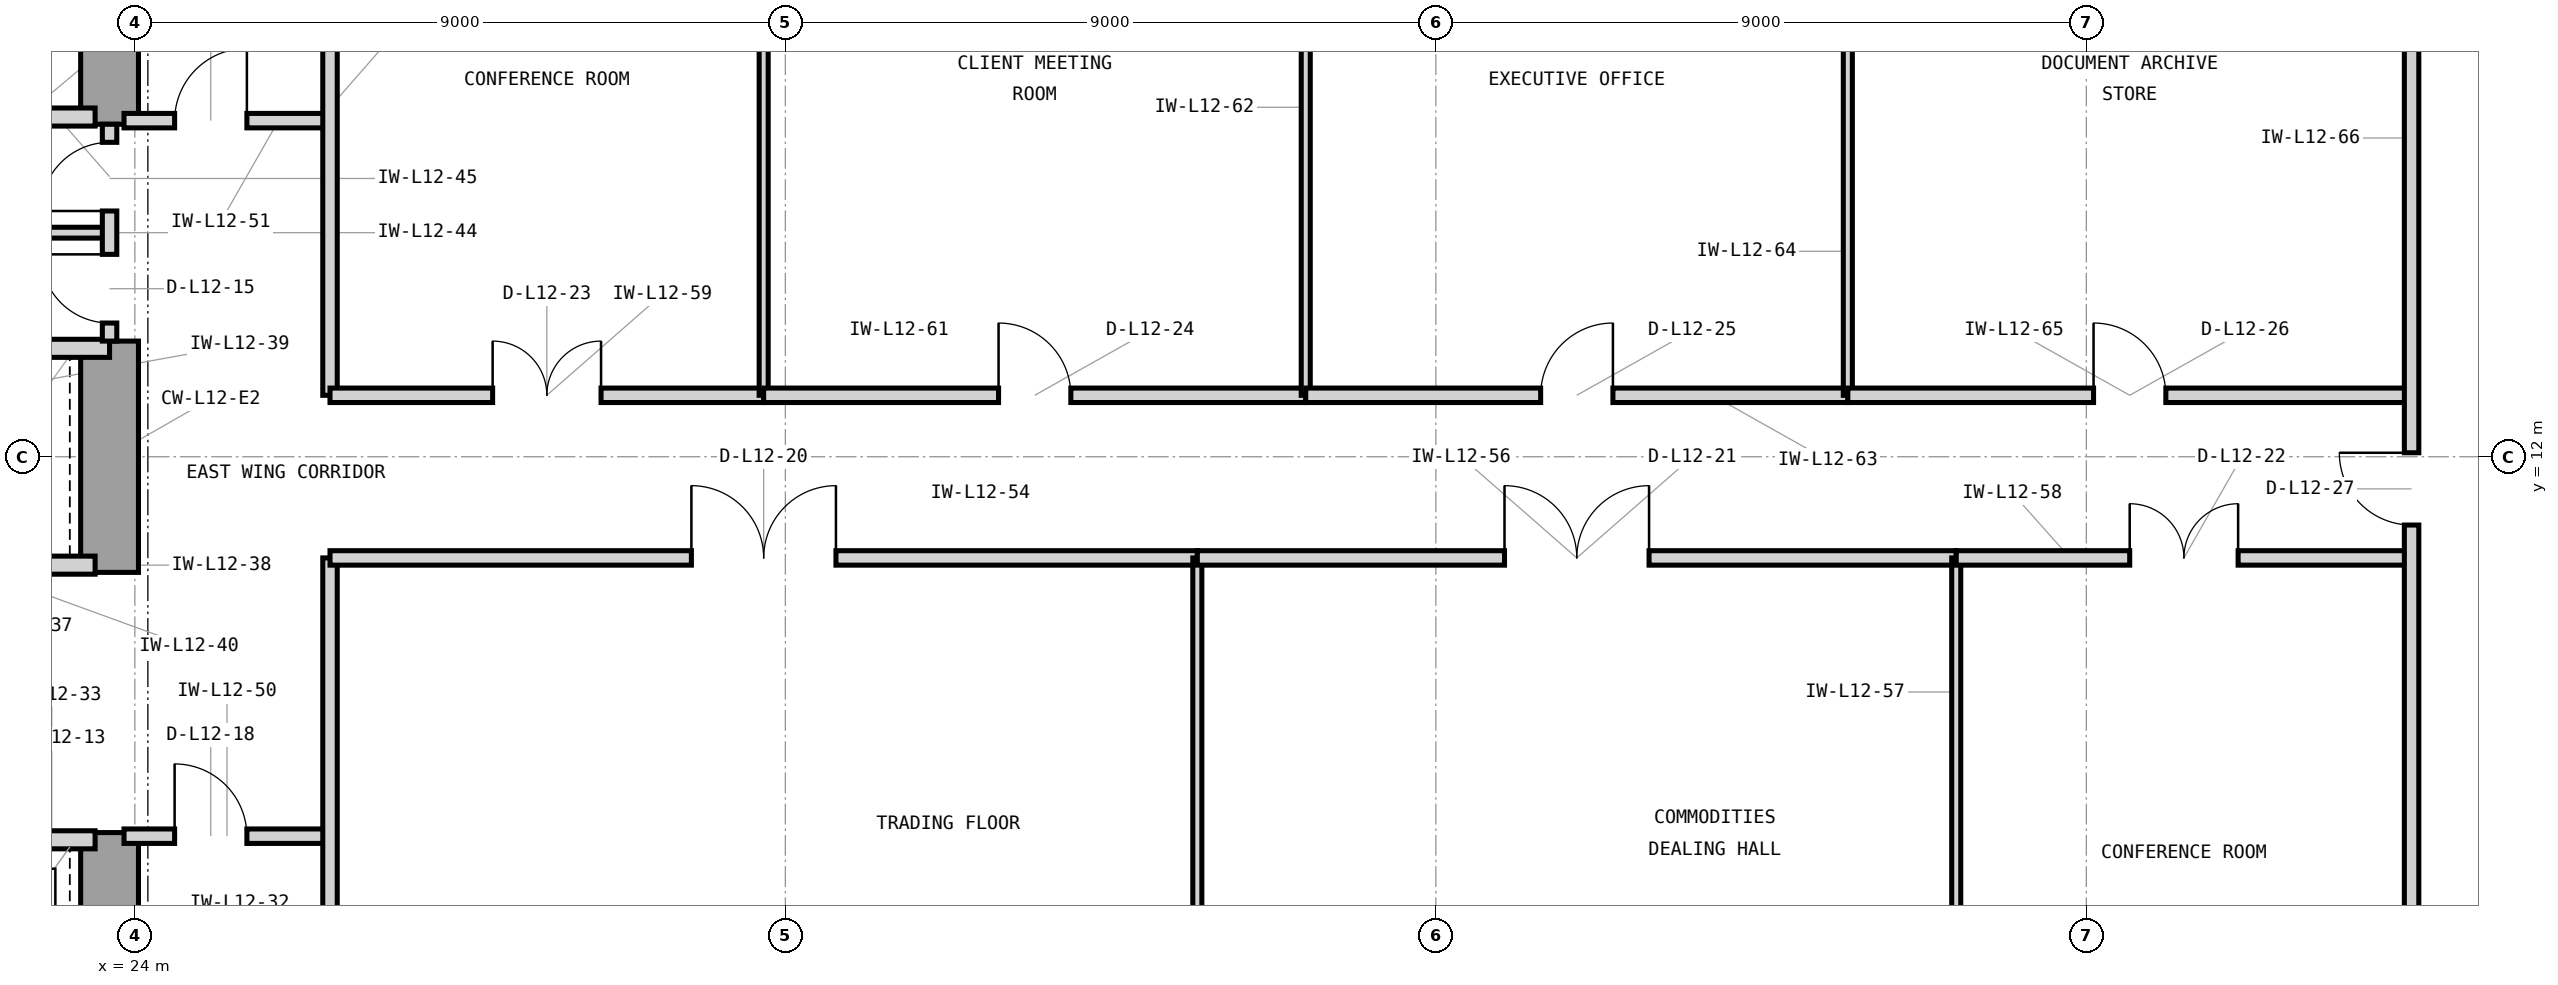
"""IFC4 building model, lengths in metres.
Left out: names, types, materials, properties, quantities, classifications, styles, units other than length and angle.
Written with IfcOpenShell. Run it as: python <this file> out.ifc"""

import sys

from ifc_helpers import new_model, si_unit, direction, frame, frame_2d, origin, place, context, subcontext, project, spatial, rectangle, extrude, element, fill, save


model = new_model("IFC4")
c1 = context("Model", 3, precision=1e-05, world=origin(), true_north=direction((0.0, 1.0)))
c2 = subcontext(c1, "Body", "Model", "MODEL_VIEW")
j1 = project(units=[si_unit("LENGTHUNIT", "METRE"), si_unit("PLANEANGLEUNIT", "RADIAN")], contexts=[c1])
p1 = place(None, origin())
s1 = spatial("IfcSite", under=j1, at=p1, CompositionType="ELEMENT")
p2 = place(p1, origin())
s2 = spatial("IfcBuilding", under=s1, at=p2, CompositionType="ELEMENT")
p3 = place(p2, frame((0.0, 0.0, 55.2)))
s3 = spatial("IfcBuildingStorey", under=s2, at=p3, CompositionType="ELEMENT", Elevation=55.2)
p4 = place(p3, frame((23.65, 3.75, 0.0), z_axis=(0.0, 0.0, 1.0), x_axis=(0.0, 1.0, 0.0)))
e1 = element("IfcWall", 1, at=p4, inside=s3, PredefinedType="SHEAR", context=c2, shape_type="SweptSolid", body=[
    extrude(rectangle(XDim=3.05, YDim=0.8, at=frame_2d((1.525, 0.0))), origin(), (0.0, 0.0, 1.0), 4.2),
])
p5 = place(p3, frame((23.65, 10.4, 0.0), z_axis=(0.0, 0.0, 1.0), x_axis=(0.0, 1.0, 0.0)))
e2 = element("IfcWall", 2, at=p5, inside=s3, PredefinedType="SHEAR", context=c2, shape_type="SweptSolid", body=[
    extrude(rectangle(XDim=3.2, YDim=0.8, at=frame_2d((1.6, 0.0))), origin(), (0.0, 0.0, 1.0), 4.2),
])
p6 = place(p3, frame((23.65, 16.6, 0.0), z_axis=(0.0, 0.0, 1.0), x_axis=(0.0, 1.0, 0.0)))
e3 = element("IfcWall", 3, at=p6, inside=s3, PredefinedType="SHEAR", context=c2, shape_type="SweptSolid", body=[
    extrude(rectangle(XDim=4.05, YDim=0.8, at=frame_2d((2.025, 0.0))), origin(), (0.0, 0.0, 1.0), 4.2),
])
p7 = place(p3, frame((21.05, 16.7, 0.0), z_axis=(0.0, 0.0, 1.0), x_axis=(1.0, 0.0, 0.0)))
e4 = element("IfcWall", 4, at=p7, inside=s3, PredefinedType="PARTITIONING", context=c2, shape_type="SweptSolid", body=[
    extrude(rectangle(XDim=2.4, YDim=0.25, at=frame_2d((1.2, 0.0))), origin(), (0.0, 0.0, 1.0), 3.426),
])
p8 = place(p3, frame((21.05, 6.7, 0.0), z_axis=(0.0, 0.0, 1.0), x_axis=(1.0, 0.0, 0.0)))
e5 = element("IfcWall", 5, at=p8, inside=s3, PredefinedType="PARTITIONING", context=c2, shape_type="SweptSolid", body=[
    extrude(rectangle(XDim=2.4, YDim=0.25, at=frame_2d((1.2, 0.0))), origin(), (0.0, 0.0, 1.0), 3.426),
])
p9 = place(p8, frame((0.48, 0.0, 0.0)))
e6 = element("IfcOpeningElement", 6, at=p9, cuts=e5, PredefinedType="OPENING", context=c2, shape_type="SweptSolid", body=[
    extrude(rectangle(XDim=1.15, YDim=2.25, at=frame_2d((0.575, 1.125))), frame((0.0, 0.135, 0.0), z_axis=(0.0, -1.0, 0.0), x_axis=(1.0, 0.0, 0.0)), (0.0, 0.0, 1.0), 0.27),
])
p10 = place(p3, frame((21.05, 10.5, 0.0), z_axis=(0.0, 0.0, 1.0), x_axis=(1.0, 0.0, 0.0)))
e7 = element("IfcWall", 7, at=p10, inside=s3, PredefinedType="PARTITIONING", context=c2, shape_type="SweptSolid", body=[
    extrude(rectangle(XDim=2.4, YDim=0.25, at=frame_2d((1.2, 0.0))), origin(), (0.0, 0.0, 1.0), 3.426),
])
p11 = place(p3, frame((14.7, 13.5, 0.0), z_axis=(0.0, 0.0, 1.0), x_axis=(1.0, 0.0, 0.0)))
e8 = element("IfcWall", 8, at=p11, inside=s3, PredefinedType="PARTITIONING", context=c2, shape_type="SweptSolid", body=[
    extrude(rectangle(XDim=8.95, YDim=0.25, at=frame_2d((4.475, 0.0))), origin(), (0.0, 0.0, 1.0), 3.426),
])
p12 = place(p3, frame((19.65, 15.1, 0.0), z_axis=(0.0, 0.0, 1.0), x_axis=(1.0, 0.0, 0.0)))
e9 = element("IfcWall", 9, at=p12, inside=s3, PredefinedType="PARTITIONING", context=c2, shape_type="SweptSolid", body=[
    extrude(rectangle(XDim=4.0, YDim=0.15, at=frame_2d((2.0, 0.0))), origin(), (0.0, 0.0, 1.0), 3.97),
])
p13 = place(p3, frame((23.65, 13.6, 0.0), z_axis=(0.0, 0.0, 1.0), x_axis=(0.0, 1.0, 0.0)))
e10 = element("IfcWall", 10, at=p13, inside=s3, PredefinedType="PARTITIONING", context=c2, shape_type="SweptSolid", body=[
    extrude(rectangle(XDim=3.0, YDim=0.2, at=frame_2d((1.5, 0.0))), origin(), (0.0, 0.0, 1.0), 3.97),
])
p14 = place(p13, frame((0.25, 0.0, 0.0)))
e11 = element("IfcOpeningElement", 11, at=p14, cuts=e10, PredefinedType="OPENING", context=c2, shape_type="SweptSolid", body=[
    extrude(rectangle(XDim=0.95, YDim=2.1, at=frame_2d((0.475, 1.05))), frame((0.0, 0.11, 0.0), z_axis=(0.0, -1.0, 0.0), x_axis=(1.0, 0.0, 0.0)), (0.0, 0.0, 1.0), 0.22),
])
p15 = place(p13, frame((1.8, 0.0, 0.0)))
e12 = element("IfcOpeningElement", 12, at=p15, cuts=e10, PredefinedType="OPENING", context=c2, shape_type="SweptSolid", body=[
    extrude(rectangle(XDim=0.95, YDim=2.1, at=frame_2d((0.475, 1.05))), frame((0.0, 0.11, 0.0), z_axis=(0.0, -1.0, 0.0), x_axis=(1.0, 0.0, 0.0)), (0.0, 0.0, 1.0), 0.22),
])
p16 = place(p3, frame((23.85, 6.75, 0.0), z_axis=(0.0, 0.0, 1.0), x_axis=(1.0, 0.0, 0.0)))
e13 = element("IfcWall", 13, at=p16, inside=s3, PredefinedType="PARTITIONING", context=c2, shape_type="SweptSolid", body=[
    extrude(rectangle(XDim=2.85, YDim=0.2, at=frame_2d((1.425, 0.0))), origin(), (0.0, 0.0, 1.0), 3.97),
])
p17 = place(p16, frame((0.7, 0.0, 0.0)))
e14 = element("IfcOpeningElement", 14, at=p17, cuts=e13, PredefinedType="OPENING", context=c2, shape_type="SweptSolid", body=[
    extrude(rectangle(XDim=1.0, YDim=2.15, at=frame_2d((0.5, 1.075))), frame((0.0, 0.11, 0.0), z_axis=(0.0, -1.0, 0.0), x_axis=(1.0, 0.0, 0.0)), (0.0, 0.0, 1.0), 0.22),
])
p18 = place(p3, frame((23.85, 16.65, 0.0), z_axis=(0.0, 0.0, 1.0), x_axis=(1.0, 0.0, 0.0)))
e15 = element("IfcWall", 15, at=p18, inside=s3, PredefinedType="PARTITIONING", context=c2, shape_type="SweptSolid", body=[
    extrude(rectangle(XDim=2.85, YDim=0.2, at=frame_2d((1.425, 0.0))), origin(), (0.0, 0.0, 1.0), 3.97),
])
p19 = place(p18, frame((0.7, 0.0, 0.0)))
e16 = element("IfcOpeningElement", 16, at=p19, cuts=e15, PredefinedType="OPENING", context=c2, shape_type="SweptSolid", body=[
    extrude(rectangle(XDim=1.0, YDim=2.15, at=frame_2d((0.5, 1.075))), frame((0.0, 0.11, 0.0), z_axis=(0.0, -1.0, 0.0), x_axis=(1.0, 0.0, 0.0)), (0.0, 0.0, 1.0), 0.22),
])
p20 = place(p3, frame((26.7, 3.18, 0.0), z_axis=(0.0, 0.0, 1.0), x_axis=(0.0, 1.0, 0.0)))
e17 = element("IfcWall", 17, at=p20, inside=s3, PredefinedType="PARTITIONING", context=c2, shape_type="SweptSolid", body=[
    extrude(rectangle(XDim=7.42, YDim=0.2, at=frame_2d((3.71, 0.0))), origin(), (0.0, 0.0, 1.0), 3.97),
])
p21 = place(p3, frame((26.7, 12.85, 0.0), z_axis=(0.0, 0.0, 1.0), x_axis=(0.0, 1.0, 0.0)))
e18 = element("IfcWall", 18, at=p21, inside=s3, PredefinedType="PARTITIONING", context=c2, shape_type="SweptSolid", body=[
    extrude(rectangle(XDim=7.97, YDim=0.2, at=frame_2d((3.985, 0.0))), origin(), (0.0, 0.0, 1.0), 3.97),
])
p22 = place(p3, frame((26.7, 10.6, 0.0), z_axis=(0.0, 0.0, 1.0), x_axis=(1.0, 0.0, 0.0)))
e19 = element("IfcWall", 19, at=p22, inside=s3, PredefinedType="PARTITIONING", context=c2, shape_type="SweptSolid", body=[
    extrude(rectangle(XDim=12.0, YDim=0.2, at=frame_2d((6.0, 0.0))), origin(), (0.0, 0.0, 1.0), 3.97),
])
p23 = place(p22, frame((5.0, 0.0, 0.0)))
e20 = element("IfcOpeningElement", 20, at=p23, cuts=e19, PredefinedType="OPENING", context=c2, shape_type="SweptSolid", body=[
    extrude(rectangle(XDim=2.0, YDim=2.5, at=frame_2d((1.0, 1.25))), frame((0.0, 0.11, 0.0), z_axis=(0.0, -1.0, 0.0), x_axis=(1.0, 0.0, 0.0)), (0.0, 0.0, 1.0), 0.22),
])
p24 = place(p3, frame((38.7, 3.18, 0.0), z_axis=(0.0, 0.0, 1.0), x_axis=(0.0, 1.0, 0.0)))
e21 = element("IfcWall", 21, at=p24, inside=s3, PredefinedType="PARTITIONING", context=c2, shape_type="SweptSolid", body=[
    extrude(rectangle(XDim=7.42, YDim=0.125, at=frame_2d((3.71, 0.0))), origin(), (0.0, 0.0, 1.0), 3.97),
])
p25 = place(p3, frame((38.7, 10.6, 0.0), z_axis=(0.0, 0.0, 1.0), x_axis=(1.0, 0.0, 0.0)))
e22 = element("IfcWall", 22, at=p25, inside=s3, PredefinedType="PARTITIONING", context=c2, shape_type="SweptSolid", body=[
    extrude(rectangle(XDim=10.5, YDim=0.2, at=frame_2d((5.25, 0.0))), origin(), (0.0, 0.0, 1.0), 3.97),
])
p26 = place(p25, frame((4.25, 0.0, 0.0)))
e23 = element("IfcOpeningElement", 23, at=p26, cuts=e22, PredefinedType="OPENING", context=c2, shape_type="SweptSolid", body=[
    extrude(rectangle(XDim=2.0, YDim=2.5, at=frame_2d((1.0, 1.25))), frame((0.0, 0.11, 0.0), z_axis=(0.0, -1.0, 0.0), x_axis=(1.0, 0.0, 0.0)), (0.0, 0.0, 1.0), 0.22),
])
p27 = place(p3, frame((49.2, 3.18, 0.0), z_axis=(0.0, 0.0, 1.0), x_axis=(0.0, 1.0, 0.0)))
e24 = element("IfcWall", 24, at=p27, inside=s3, PredefinedType="PARTITIONING", context=c2, shape_type="SweptSolid", body=[
    extrude(rectangle(XDim=7.42, YDim=0.125, at=frame_2d((3.71, 0.0))), origin(), (0.0, 0.0, 1.0), 3.97),
])
p28 = place(p3, frame((49.2, 10.6, 0.0), z_axis=(0.0, 0.0, 1.0), x_axis=(1.0, 0.0, 0.0)))
e25 = element("IfcWall", 25, at=p28, inside=s3, PredefinedType="PARTITIONING", context=c2, shape_type="SweptSolid", body=[
    extrude(rectangle(XDim=6.3, YDim=0.2, at=frame_2d((3.15, 0.0))), origin(), (0.0, 0.0, 1.0), 3.97),
])
p29 = place(p28, frame((2.4, 0.0, 0.0)))
e26 = element("IfcOpeningElement", 26, at=p29, cuts=e25, PredefinedType="OPENING", context=c2, shape_type="SweptSolid", body=[
    extrude(rectangle(XDim=1.5, YDim=2.3, at=frame_2d((0.75, 1.15))), frame((0.0, 0.11, 0.0), z_axis=(0.0, -1.0, 0.0), x_axis=(1.0, 0.0, 0.0)), (0.0, 0.0, 1.0), 0.22),
])
p30 = place(p3, frame((26.7, 12.85, 0.0), z_axis=(0.0, 0.0, 1.0), x_axis=(1.0, 0.0, 0.0)))
e27 = element("IfcWall", 27, at=p30, inside=s3, PredefinedType="PARTITIONING", context=c2, shape_type="SweptSolid", body=[
    extrude(rectangle(XDim=6.0, YDim=0.2, at=frame_2d((3.0, 0.0))), origin(), (0.0, 0.0, 1.0), 3.97),
])
p31 = place(p30, frame((2.25, 0.0, 0.0)))
e28 = element("IfcOpeningElement", 28, at=p31, cuts=e27, PredefinedType="OPENING", context=c2, shape_type="SweptSolid", body=[
    extrude(rectangle(XDim=1.5, YDim=2.3, at=frame_2d((0.75, 1.15))), frame((0.0, 0.11, 0.0), z_axis=(0.0, -1.0, 0.0), x_axis=(1.0, 0.0, 0.0)), (0.0, 0.0, 1.0), 0.22),
])
p32 = place(p3, frame((32.7, 12.85, 0.0), z_axis=(0.0, 0.0, 1.0), x_axis=(0.0, 1.0, 0.0)))
e29 = element("IfcWall", 29, at=p32, inside=s3, PredefinedType="PARTITIONING", context=c2, shape_type="SweptSolid", body=[
    extrude(rectangle(XDim=7.97, YDim=0.125, at=frame_2d((3.985, 0.0))), origin(), (0.0, 0.0, 1.0), 3.97),
])
p33 = place(p3, frame((32.7, 12.85, 0.0), z_axis=(0.0, 0.0, 1.0), x_axis=(1.0, 0.0, 0.0)))
e30 = element("IfcWall", 30, at=p33, inside=s3, PredefinedType="PARTITIONING", context=c2, shape_type="SweptSolid", body=[
    extrude(rectangle(XDim=7.5, YDim=0.2, at=frame_2d((3.75, 0.0))), origin(), (0.0, 0.0, 1.0), 3.97),
])
p34 = place(p33, frame((3.25, 0.0, 0.0)))
e31 = element("IfcOpeningElement", 31, at=p34, cuts=e30, PredefinedType="OPENING", context=c2, shape_type="SweptSolid", body=[
    extrude(rectangle(XDim=1.0, YDim=2.15, at=frame_2d((0.5, 1.075))), frame((0.0, 0.11, 0.0), z_axis=(0.0, -1.0, 0.0), x_axis=(1.0, 0.0, 0.0)), (0.0, 0.0, 1.0), 0.22),
])
p35 = place(p3, frame((40.2, 12.85, 0.0), z_axis=(0.0, 0.0, 1.0), x_axis=(0.0, 1.0, 0.0)))
e32 = element("IfcWall", 32, at=p35, inside=s3, PredefinedType="PARTITIONING", context=c2, shape_type="SweptSolid", body=[
    extrude(rectangle(XDim=7.97, YDim=0.125, at=frame_2d((3.985, 0.0))), origin(), (0.0, 0.0, 1.0), 3.97),
])
p36 = place(p3, frame((40.2, 12.85, 0.0), z_axis=(0.0, 0.0, 1.0), x_axis=(1.0, 0.0, 0.0)))
e33 = element("IfcWall", 33, at=p36, inside=s3, PredefinedType="PARTITIONING", context=c2, shape_type="SweptSolid", body=[
    extrude(rectangle(XDim=7.5, YDim=0.2, at=frame_2d((3.75, 0.0))), origin(), (0.0, 0.0, 1.0), 3.97),
])
p37 = place(p36, frame((3.25, 0.0, 0.0)))
e34 = element("IfcOpeningElement", 34, at=p37, cuts=e33, PredefinedType="OPENING", context=c2, shape_type="SweptSolid", body=[
    extrude(rectangle(XDim=1.0, YDim=2.15, at=frame_2d((0.5, 1.075))), frame((0.0, 0.11, 0.0), z_axis=(0.0, -1.0, 0.0), x_axis=(1.0, 0.0, 0.0)), (0.0, 0.0, 1.0), 0.22),
])
p38 = place(p3, frame((47.7, 12.85, 0.0), z_axis=(0.0, 0.0, 1.0), x_axis=(0.0, 1.0, 0.0)))
e35 = element("IfcWall", 35, at=p38, inside=s3, PredefinedType="PARTITIONING", context=c2, shape_type="SweptSolid", body=[
    extrude(rectangle(XDim=7.97, YDim=0.125, at=frame_2d((3.985, 0.0))), origin(), (0.0, 0.0, 1.0), 3.97),
])
p39 = place(p3, frame((47.7, 12.85, 0.0), z_axis=(0.0, 0.0, 1.0), x_axis=(1.0, 0.0, 0.0)))
e36 = element("IfcWall", 36, at=p39, inside=s3, PredefinedType="PARTITIONING", context=c2, shape_type="SweptSolid", body=[
    extrude(rectangle(XDim=7.8, YDim=0.2, at=frame_2d((3.9, 0.0))), origin(), (0.0, 0.0, 1.0), 3.97),
])
p40 = place(p39, frame((3.4, 0.0, 0.0)))
e37 = element("IfcOpeningElement", 37, at=p40, cuts=e36, PredefinedType="OPENING", context=c2, shape_type="SweptSolid", body=[
    extrude(rectangle(XDim=1.0, YDim=2.15, at=frame_2d((0.5, 1.075))), frame((0.0, 0.11, 0.0), z_axis=(0.0, -1.0, 0.0), x_axis=(1.0, 0.0, 0.0)), (0.0, 0.0, 1.0), 0.22),
])
p41 = place(p3, frame((55.5, 3.18, 0.0), z_axis=(0.0, 0.0, 1.0), x_axis=(0.0, 1.0, 0.0)))
e38 = element("IfcWall", 38, at=p41, inside=s3, PredefinedType="PARTITIONING", context=c2, shape_type="SweptSolid", body=[
    extrude(rectangle(XDim=17.64, YDim=0.2, at=frame_2d((8.82, 0.0))), origin(), (0.0, 0.0, 1.0), 3.97),
])
p42 = place(p41, frame((7.875, 0.0, 0.0)))
e39 = element("IfcOpeningElement", 39, at=p42, cuts=e38, PredefinedType="OPENING", context=c2, shape_type="SweptSolid", body=[
    extrude(rectangle(XDim=1.0, YDim=2.15, at=frame_2d((0.5, 1.075))), frame((0.0, 0.11, 0.0), z_axis=(0.0, -1.0, 0.0), x_axis=(1.0, 0.0, 0.0)), (0.0, 0.0, 1.0), 0.22),
])
p43 = place(p14, origin())
e40 = element("IfcDoor", 40, at=p43, inside=s3, OperationType="SINGLE_SWING_RIGHT", PredefinedType="DOOR", context=c2, shape_type="SweptSolid", body=[
    extrude(rectangle(XDim=0.95, YDim=2.1, at=frame_2d((0.475, 1.05))), frame((0.0, 0.025, 0.0), z_axis=(0.0, -1.0, 0.0), x_axis=(1.0, 0.0, 0.0)), (0.0, 0.0, 1.0), 0.05),
])
fill(e11, e40)
p44 = place(p15, origin())
e41 = element("IfcDoor", 41, at=p44, inside=s3, OperationType="SINGLE_SWING_LEFT", PredefinedType="DOOR", context=c2, shape_type="SweptSolid", body=[
    extrude(rectangle(XDim=0.95, YDim=2.1, at=frame_2d((0.475, 1.05))), frame((0.0, 0.025, 0.0), z_axis=(0.0, -1.0, 0.0), x_axis=(1.0, 0.0, 0.0)), (0.0, 0.0, 1.0), 0.05),
])
fill(e12, e41)
p45 = place(p17, origin())
e42 = element("IfcDoor", 42, at=p45, inside=s3, OperationType="SINGLE_SWING_LEFT", PredefinedType="DOOR", context=c2, shape_type="SweptSolid", body=[
    extrude(rectangle(XDim=1.0, YDim=2.15, at=frame_2d((0.5, 1.075))), frame((0.0, 0.025, 0.0), z_axis=(0.0, -1.0, 0.0), x_axis=(1.0, 0.0, 0.0)), (0.0, 0.0, 1.0), 0.05),
])
fill(e14, e42)
p46 = place(p19, origin())
e43 = element("IfcDoor", 43, at=p46, inside=s3, OperationType="SINGLE_SWING_RIGHT", PredefinedType="DOOR", context=c2, shape_type="SweptSolid", body=[
    extrude(rectangle(XDim=1.0, YDim=2.15, at=frame_2d((0.5, 1.075))), frame((0.0, 0.025, 0.0), z_axis=(0.0, -1.0, 0.0), x_axis=(1.0, 0.0, 0.0)), (0.0, 0.0, 1.0), 0.05),
])
fill(e16, e43)
p47 = place(p23, origin())
e44 = element("IfcDoor", 44, at=p47, inside=s3, OperationType="DOUBLE_DOOR_SINGLE_SWING", PredefinedType="DOOR", context=c2, shape_type="SweptSolid", body=[
    extrude(rectangle(XDim=2.0, YDim=2.5, at=frame_2d((1.0, 1.25))), frame((0.0, 0.025, 0.0), z_axis=(0.0, -1.0, 0.0), x_axis=(1.0, 0.0, 0.0)), (0.0, 0.0, 1.0), 0.05),
])
fill(e20, e44)
p48 = place(p26, origin())
e45 = element("IfcDoor", 45, at=p48, inside=s3, OperationType="DOUBLE_DOOR_SINGLE_SWING", PredefinedType="DOOR", context=c2, shape_type="SweptSolid", body=[
    extrude(rectangle(XDim=2.0, YDim=2.5, at=frame_2d((1.0, 1.25))), frame((0.0, 0.025, 0.0), z_axis=(0.0, -1.0, 0.0), x_axis=(1.0, 0.0, 0.0)), (0.0, 0.0, 1.0), 0.05),
])
fill(e23, e45)
p49 = place(p29, origin())
e46 = element("IfcDoor", 46, at=p49, inside=s3, OperationType="DOUBLE_DOOR_SINGLE_SWING", PredefinedType="DOOR", context=c2, shape_type="SweptSolid", body=[
    extrude(rectangle(XDim=1.5, YDim=2.3, at=frame_2d((0.75, 1.15))), frame((0.0, 0.025, 0.0), z_axis=(0.0, -1.0, 0.0), x_axis=(1.0, 0.0, 0.0)), (0.0, 0.0, 1.0), 0.05),
])
fill(e26, e46)
p50 = place(p31, origin())
e47 = element("IfcDoor", 47, at=p50, inside=s3, OperationType="DOUBLE_DOOR_SINGLE_SWING", PredefinedType="DOOR", context=c2, shape_type="SweptSolid", body=[
    extrude(rectangle(XDim=1.5, YDim=2.3, at=frame_2d((0.75, 1.15))), frame((0.0, 0.025, 0.0), z_axis=(0.0, -1.0, 0.0), x_axis=(1.0, 0.0, 0.0)), (0.0, 0.0, 1.0), 0.05),
])
fill(e28, e47)
p51 = place(p34, origin())
e48 = element("IfcDoor", 48, at=p51, inside=s3, OperationType="SINGLE_SWING_LEFT", PredefinedType="DOOR", context=c2, shape_type="SweptSolid", body=[
    extrude(rectangle(XDim=1.0, YDim=2.15, at=frame_2d((0.5, 1.075))), frame((0.0, 0.025, 0.0), z_axis=(0.0, -1.0, 0.0), x_axis=(1.0, 0.0, 0.0)), (0.0, 0.0, 1.0), 0.05),
])
fill(e31, e48)
p52 = place(p37, origin())
e49 = element("IfcDoor", 49, at=p52, inside=s3, OperationType="SINGLE_SWING_RIGHT", PredefinedType="DOOR", context=c2, shape_type="SweptSolid", body=[
    extrude(rectangle(XDim=1.0, YDim=2.15, at=frame_2d((0.5, 1.075))), frame((0.0, 0.025, 0.0), z_axis=(0.0, -1.0, 0.0), x_axis=(1.0, 0.0, 0.0)), (0.0, 0.0, 1.0), 0.05),
])
fill(e34, e49)
p53 = place(p40, origin())
e50 = element("IfcDoor", 50, at=p53, inside=s3, OperationType="SINGLE_SWING_LEFT", PredefinedType="DOOR", context=c2, shape_type="SweptSolid", body=[
    extrude(rectangle(XDim=1.0, YDim=2.15, at=frame_2d((0.5, 1.075))), frame((0.0, 0.025, 0.0), z_axis=(0.0, -1.0, 0.0), x_axis=(1.0, 0.0, 0.0)), (0.0, 0.0, 1.0), 0.05),
])
fill(e37, e50)
p54 = place(p42, origin())
e51 = element("IfcDoor", 51, at=p54, inside=s3, OperationType="SINGLE_SWING_RIGHT", PredefinedType="DOOR", context=c2, shape_type="SweptSolid", body=[
    extrude(rectangle(XDim=1.0, YDim=2.15, at=frame_2d((0.5, 1.075))), frame((0.0, 0.025, 0.0), z_axis=(0.0, -1.0, 0.0), x_axis=(1.0, 0.0, 0.0)), (0.0, 0.0, 1.0), 0.05),
])
fill(e39, e51)
save(model, sys.argv[1])
